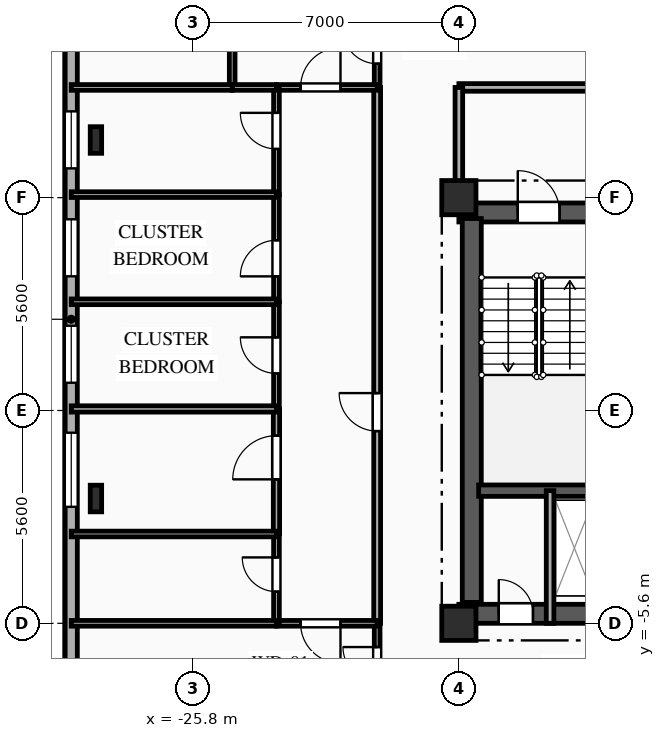
"""IFC4 building model, lengths in metres.
Left out: names, types, materials, properties, quantities, classifications, styles, units other than length and angle.
Written with IfcOpenShell. Run it as: python <this file> out.ifc"""

import sys

from ifc_helpers import new_model, si_unit, direction, frame, frame_2d, origin, origin_2d, place, context, subcontext, project, spatial, rectangle, i_section, extrude, element, fill, save


model = new_model("IFC4")
c1 = context("Model", 3, precision=1e-05, world=origin(), true_north=direction((0.0, 1.0)))
c2 = subcontext(c1, "Body", "Model", "MODEL_VIEW")
j1 = project(units=[si_unit("LENGTHUNIT", "METRE"), si_unit("PLANEANGLEUNIT", "RADIAN")], contexts=[c1])
p1 = place(None, origin())
s1 = spatial("IfcSite", under=j1, at=p1, CompositionType="ELEMENT")
p2 = place(p1, origin())
s2 = spatial("IfcBuilding", under=s1, at=p2, CompositionType="ELEMENT")
p3 = place(p2, frame((0.0, 0.0, 164.5)))
s3 = spatial("IfcBuildingStorey", under=s2, at=p3, CompositionType="ELEMENT", Elevation=164.5)
for number, where, z_axis, x_axis in (
    (1, (-18.8, -5.6, 0.0), (0.0, 0.0, 1.0), (1.0, 0.0, 0.0)),
    (2, (-18.8, 5.6, 0.0), (0.0, 0.0, 1.0), (1.0, 0.0, 0.0)),
):
    element("IfcColumn", number, at=place(p3, frame(where, z_axis=z_axis, x_axis=x_axis)), inside=s3, PredefinedType="COLUMN", context=c2, shape_type="SweptSolid", body=[
        extrude(rectangle(XDim=0.9, YDim=0.9, at=origin_2d()), origin(), (0.0, 0.0, 1.0), 3.35),
    ])
for number, where, z_axis, x_axis in (
    (3, (-28.35, 7.117, 0.0), (0.0, 0.0, 1.0), (1.0, 0.0, 0.0)),
    (4, (-28.35, -2.317, 0.0), (0.0, 0.0, 1.0), (1.0, 0.0, 0.0)),
):
    element("IfcColumn", number, at=place(p3, frame(where, z_axis=z_axis, x_axis=x_axis)), inside=s3, PredefinedType="COLUMN", context=c2, shape_type="SweptSolid", body=[
        extrude(i_section(OverallWidth=0.3, OverallDepth=0.7, WebThickness=0.017, FlangeThickness=0.032, FilletRadius=0.027, at=origin_2d()), origin(), (0.0, 0.0, 1.0), 3.35),
    ])
p4 = place(p3, frame((-29.0, -12.4, 0.0), z_axis=(0.0, 0.0, 1.0), x_axis=(0.0, 1.0, 0.0)))
e5 = element("IfcWall", 5, at=p4, inside=s3, PredefinedType="SOLIDWALL", context=c2, shape_type="SweptSolid", body=[
    extrude(rectangle(XDim=29.6, YDim=0.32, at=frame_2d((14.8, 0.0))), origin(), (0.0, 0.0, 1.0), 3.04),
])
p5 = place(p4, frame((2.855, 0.0, 0.85)))
e6 = element("IfcOpeningElement", 6, at=p5, cuts=e5, PredefinedType="OPENING", context=c2, shape_type="SweptSolid", body=[
    extrude(rectangle(XDim=1.65, YDim=1.85, at=frame_2d((0.825, 0.925))), frame((0.0, 0.17, 0.0), z_axis=(0.0, -1.0, 0.0), x_axis=(1.0, 0.0, 0.0)), (0.0, 0.0, 1.0), 0.34),
])
p6 = place(p4, frame((9.865, 0.0, 0.85)))
e7 = element("IfcOpeningElement", 7, at=p6, cuts=e5, PredefinedType="OPENING", context=c2, shape_type="SweptSolid", body=[
    extrude(rectangle(XDim=1.95, YDim=1.85, at=frame_2d((0.975, 0.925))), frame((0.0, 0.17, 0.0), z_axis=(0.0, -1.0, 0.0), x_axis=(1.0, 0.0, 0.0)), (0.0, 0.0, 1.0), 0.34),
])
p7 = place(p4, frame((13.13, 0.0, 0.85)))
e8 = element("IfcOpeningElement", 8, at=p7, cuts=e5, PredefinedType="OPENING", context=c2, shape_type="SweptSolid", body=[
    extrude(rectangle(XDim=1.5, YDim=1.85, at=frame_2d((0.75, 0.925))), frame((0.0, 0.17, 0.0), z_axis=(0.0, -1.0, 0.0), x_axis=(1.0, 0.0, 0.0)), (0.0, 0.0, 1.0), 0.34),
])
p8 = place(p4, frame((15.93, 0.0, 0.85)))
e9 = element("IfcOpeningElement", 9, at=p8, cuts=e5, PredefinedType="OPENING", context=c2, shape_type="SweptSolid", body=[
    extrude(rectangle(XDim=1.5, YDim=1.85, at=frame_2d((0.75, 0.925))), frame((0.0, 0.17, 0.0), z_axis=(0.0, -1.0, 0.0), x_axis=(1.0, 0.0, 0.0)), (0.0, 0.0, 1.0), 0.34),
])
p9 = place(p4, frame((18.77, 0.0, 0.85)))
e10 = element("IfcOpeningElement", 10, at=p9, cuts=e5, PredefinedType="OPENING", context=c2, shape_type="SweptSolid", body=[
    extrude(rectangle(XDim=1.5, YDim=1.85, at=frame_2d((0.75, 0.925))), frame((0.0, 0.17, 0.0), z_axis=(0.0, -1.0, 0.0), x_axis=(1.0, 0.0, 0.0)), (0.0, 0.0, 1.0), 0.34),
])
p10 = place(p4, frame((24.255, 0.0, 0.85)))
e11 = element("IfcOpeningElement", 11, at=p10, cuts=e5, PredefinedType="OPENING", context=c2, shape_type="SweptSolid", body=[
    extrude(rectangle(XDim=1.65, YDim=1.85, at=frame_2d((0.825, 0.925))), frame((0.0, 0.17, 0.0), z_axis=(0.0, -1.0, 0.0), x_axis=(1.0, 0.0, 0.0)), (0.0, 0.0, 1.0), 0.34),
])
p11 = place(p3, frame((-18.8, 5.21, 0.0), z_axis=(0.0, 0.0, 1.0), x_axis=(1.0, 0.0, 0.0)))
e12 = element("IfcWall", 12, at=p11, inside=s3, PredefinedType="SHEAR", context=c2, shape_type="SweptSolid", body=[
    extrude(rectangle(XDim=9.6, YDim=0.5, at=frame_2d((4.8, 0.0))), origin(), (0.0, 0.0, 1.0), 3.04),
])
p12 = place(p11, frame((1.55, 0.0, 0.0)))
e13 = element("IfcOpeningElement", 13, at=p12, cuts=e12, PredefinedType="OPENING", context=c2, shape_type="SweptSolid", body=[
    extrude(rectangle(XDim=1.1, YDim=2.15, at=frame_2d((0.55, 1.075))), frame((0.0, 0.26, 0.0), z_axis=(0.0, -1.0, 0.0), x_axis=(1.0, 0.0, 0.0)), (0.0, 0.0, 1.0), 0.52),
])
p13 = place(p11, frame((4.775, 0.0, 0.0)))
e14 = element("IfcOpeningElement", 14, at=p13, cuts=e12, PredefinedType="OPENING", context=c2, shape_type="SweptSolid", body=[
    extrude(rectangle(XDim=1.05, YDim=2.1, at=frame_2d((0.525, 1.05))), frame((0.0, 0.26, 0.0), z_axis=(0.0, -1.0, 0.0), x_axis=(1.0, 0.0, 0.0)), (0.0, 0.0, 1.0), 0.52),
])
p14 = place(p3, frame((-18.8, -5.35, 0.0), z_axis=(0.0, 0.0, 1.0), x_axis=(1.0, 0.0, 0.0)))
e15 = element("IfcWall", 15, at=p14, inside=s3, PredefinedType="SHEAR", context=c2, shape_type="SweptSolid", body=[
    extrude(rectangle(XDim=9.6, YDim=0.5, at=frame_2d((4.8, 0.0))), origin(), (0.0, 0.0, 1.0), 3.04),
])
p15 = place(p14, frame((1.05, 0.0, 0.0)))
e16 = element("IfcOpeningElement", 16, at=p15, cuts=e15, PredefinedType="OPENING", context=c2, shape_type="SweptSolid", body=[
    extrude(rectangle(XDim=0.9, YDim=2.1, at=frame_2d((0.45, 1.05))), frame((0.0, 0.26, 0.0), z_axis=(0.0, -1.0, 0.0), x_axis=(1.0, 0.0, 0.0)), (0.0, 0.0, 1.0), 0.52),
])
p16 = place(p3, frame((-18.46, -5.05, 0.0), z_axis=(0.0, 0.0, 1.0), x_axis=(0.0, 1.0, 0.0)))
e17 = element("IfcWall", 17, at=p16, inside=s3, PredefinedType="SHEAR", context=c2, shape_type="SweptSolid", body=[
    extrude(rectangle(XDim=10.1, YDim=0.5, at=frame_2d((5.05, 0.0))), origin(), (0.0, 0.0, 1.0), 3.04),
])
p17 = place(p3, frame((-18.28, -2.11, 0.0), z_axis=(0.0, 0.0, 1.0), x_axis=(1.0, 0.0, 0.0)))
e18 = element("IfcWall", 18, at=p17, inside=s3, PredefinedType="SHEAR", context=c2, shape_type="SweptSolid", body=[
    extrude(rectangle(XDim=3.18, YDim=0.3, at=frame_2d((1.59, 0.0))), origin(), (0.0, 0.0, 1.0), 3.04),
])
p18 = place(p3, frame((-16.4, -5.6, 0.0), z_axis=(0.0, 0.0, 1.0), x_axis=(0.0, 1.0, 0.0)))
e19 = element("IfcWall", 19, at=p18, inside=s3, PredefinedType="PARTITIONING", context=c2, shape_type="SweptSolid", body=[
    extrude(rectangle(XDim=3.49, YDim=0.2, at=frame_2d((1.745, 0.0))), origin(), (0.0, 0.0, 1.0), 3.04),
])
p19 = place(p3, frame((-12.0, 8.5, 0.0), z_axis=(0.0, 0.0, 1.0), x_axis=(-1.0, 0.0, 0.0)))
e20 = element("IfcWall", 20, at=p19, inside=s3, PredefinedType="PARTITIONING", context=c2, shape_type="SweptSolid", body=[
    extrude(rectangle(XDim=6.8, YDim=0.2, at=frame_2d((3.4, 0.0))), origin(), (0.0, 0.0, 1.0), 3.04),
])
p20 = place(p19, frame((1.715, 0.0, 0.0)))
e21 = element("IfcOpeningElement", 21, at=p20, cuts=e20, PredefinedType="OPENING", context=c2, shape_type="SweptSolid", body=[
    extrude(rectangle(XDim=1.1, YDim=2.15, at=frame_2d((0.55, 1.075))), frame((0.0, 0.11, 0.0), z_axis=(0.0, -1.0, 0.0), x_axis=(1.0, 0.0, 0.0)), (0.0, 0.0, 1.0), 0.22),
])
p21 = place(p3, frame((-18.8, 8.5, 0.0), z_axis=(0.0, 0.0, 1.0), x_axis=(0.0, -1.0, 0.0)))
e22 = element("IfcWall", 22, at=p21, inside=s3, PredefinedType="PARTITIONING", context=c2, shape_type="SweptSolid", body=[
    extrude(rectangle(XDim=2.9, YDim=0.2, at=frame_2d((1.45, 0.0))), origin(), (0.0, 0.0, 1.0), 2.525),
])
p22 = place(p3, frame((-20.95, 8.5, 0.0), z_axis=(0.0, 0.0, 1.0), x_axis=(0.0, 1.0, 0.0)))
e23 = element("IfcWall", 23, at=p22, inside=s3, PredefinedType="PARTITIONING", context=c2, shape_type="SweptSolid", body=[
    extrude(rectangle(XDim=2.15, YDim=0.15, at=frame_2d((1.075, 0.0))), origin(), (0.0, 0.0, 1.0), 3.04),
])
p23 = place(p22, frame((0.625, 0.0, 0.0)))
e24 = element("IfcOpeningElement", 24, at=p23, cuts=e23, PredefinedType="OPENING", context=c2, shape_type="SweptSolid", body=[
    extrude(rectangle(XDim=0.9, YDim=2.1, at=frame_2d((0.45, 1.05))), frame((0.0, 0.085, 0.0), z_axis=(0.0, -1.0, 0.0), x_axis=(1.0, 0.0, 0.0)), (0.0, 0.0, 1.0), 0.17),
])
p24 = place(p3, frame((-20.95, -7.75, 0.0), z_axis=(0.0, 0.0, 1.0), x_axis=(0.0, 1.0, 0.0)))
e25 = element("IfcWall", 25, at=p24, inside=s3, PredefinedType="PARTITIONING", context=c2, shape_type="SweptSolid", body=[
    extrude(rectangle(XDim=2.15, YDim=0.15, at=frame_2d((1.075, 0.0))), origin(), (0.0, 0.0, 1.0), 3.04),
])
p25 = place(p24, frame((0.625, 0.0, 0.0)))
e26 = element("IfcOpeningElement", 26, at=p25, cuts=e25, PredefinedType="OPENING", context=c2, shape_type="SweptSolid", body=[
    extrude(rectangle(XDim=0.9, YDim=2.1, at=frame_2d((0.45, 1.05))), frame((0.0, 0.085, 0.0), z_axis=(0.0, -1.0, 0.0), x_axis=(1.0, 0.0, 0.0)), (0.0, 0.0, 1.0), 0.17),
])
p26 = place(p3, frame((-20.95, -5.6, 0.0), z_axis=(0.0, 0.0, 1.0), x_axis=(0.0, 1.0, 0.0)))
e27 = element("IfcWall", 27, at=p26, inside=s3, PredefinedType="PARTITIONING", context=c2, shape_type="SweptSolid", body=[
    extrude(rectangle(XDim=14.1, YDim=0.18, at=frame_2d((7.05, 0.0))), origin(), (0.0, 0.0, 1.0), 3.04),
])
p27 = place(p26, frame((5.058, 0.0, 0.0)))
e28 = element("IfcOpeningElement", 28, at=p27, cuts=e27, PredefinedType="OPENING", context=c2, shape_type="SweptSolid", body=[
    extrude(rectangle(XDim=1.0, YDim=2.15, at=frame_2d((0.5, 1.075))), frame((0.0, 0.1, 0.0), z_axis=(0.0, -1.0, 0.0), x_axis=(1.0, 0.0, 0.0)), (0.0, 0.0, 1.0), 0.2),
])
p28 = place(p3, frame((-23.6, 8.5, 0.0), z_axis=(0.0, 0.0, 1.0), x_axis=(1.0, 0.0, 0.0)))
e29 = element("IfcWall", 29, at=p28, inside=s3, PredefinedType="PARTITIONING", context=c2, shape_type="SweptSolid", body=[
    extrude(rectangle(XDim=2.65, YDim=0.15, at=frame_2d((1.325, 0.0))), origin(), (0.0, 0.0, 1.0), 3.04),
])
p29 = place(p28, frame((0.635, 0.0, 0.0)))
e30 = element("IfcOpeningElement", 30, at=p29, cuts=e29, PredefinedType="OPENING", context=c2, shape_type="SweptSolid", body=[
    extrude(rectangle(XDim=1.05, YDim=2.15, at=frame_2d((0.525, 1.075))), frame((0.0, 0.085, 0.0), z_axis=(0.0, -1.0, 0.0), x_axis=(1.0, 0.0, 0.0)), (0.0, 0.0, 1.0), 0.17),
])
p30 = place(p3, frame((-20.95, -5.6, 0.0), z_axis=(0.0, 0.0, 1.0), x_axis=(-1.0, 0.0, 0.0)))
e31 = element("IfcWall", 31, at=p30, inside=s3, PredefinedType="PARTITIONING", context=c2, shape_type="SweptSolid", body=[
    extrude(rectangle(XDim=2.65, YDim=0.15, at=frame_2d((1.325, 0.0))), origin(), (0.0, 0.0, 1.0), 3.04),
])
p31 = place(p30, frame((0.965, 0.0, 0.0)))
e32 = element("IfcOpeningElement", 32, at=p31, cuts=e31, PredefinedType="OPENING", context=c2, shape_type="SweptSolid", body=[
    extrude(rectangle(XDim=1.05, YDim=2.15, at=frame_2d((0.525, 1.075))), frame((0.0, 0.085, 0.0), z_axis=(0.0, -1.0, 0.0), x_axis=(1.0, 0.0, 0.0)), (0.0, 0.0, 1.0), 0.17),
])
p32 = place(p3, frame((-23.6, -5.6, 0.0), z_axis=(0.0, 0.0, 1.0), x_axis=(0.0, 1.0, 0.0)))
e33 = element("IfcWall", 33, at=p32, inside=s3, PredefinedType="PLUMBINGWALL", context=c2, shape_type="SweptSolid", body=[
    extrude(rectangle(XDim=2.35, YDim=0.15, at=frame_2d((1.175, 0.0))), origin(), (0.0, 0.0, 1.0), 2.695),
])
p33 = place(p32, frame((0.834, 0.0, 0.0)))
e34 = element("IfcOpeningElement", 34, at=p33, cuts=e33, PredefinedType="OPENING", context=c2, shape_type="SweptSolid", body=[
    extrude(rectangle(XDim=0.9, YDim=2.1, at=frame_2d((0.45, 1.05))), frame((0.0, 0.085, 0.0), z_axis=(0.0, -1.0, 0.0), x_axis=(1.0, 0.0, 0.0)), (0.0, 0.0, 1.0), 0.17),
])
p34 = place(p3, frame((-23.6, -3.25, 0.0), z_axis=(0.0, 0.0, 1.0), x_axis=(0.0, 1.0, 0.0)))
e35 = element("IfcWall", 35, at=p34, inside=s3, PredefinedType="PARTITIONING", context=c2, shape_type="SweptSolid", body=[
    extrude(rectangle(XDim=3.29, YDim=0.165, at=frame_2d((1.645, 0.0))), origin(), (0.0, 0.0, 1.0), 2.695),
])
p35 = place(p34, frame((1.438, 0.0, 0.0)))
e36 = element("IfcOpeningElement", 36, at=p35, cuts=e35, PredefinedType="OPENING", context=c2, shape_type="SweptSolid", body=[
    extrude(rectangle(XDim=1.15, YDim=2.15, at=frame_2d((0.575, 1.075))), frame((0.0, 0.093, 0.0), z_axis=(0.0, -1.0, 0.0), x_axis=(1.0, 0.0, 0.0)), (0.0, 0.0, 1.0), 0.185),
])
p36 = place(p3, frame((-23.6, 0.04, 0.0), z_axis=(0.0, 0.0, 1.0), x_axis=(0.0, 1.0, 0.0)))
e37 = element("IfcWall", 37, at=p36, inside=s3, PredefinedType="PARTITIONING", context=c2, shape_type="SweptSolid", body=[
    extrude(rectangle(XDim=2.82, YDim=0.15, at=frame_2d((1.41, 0.0))), origin(), (0.0, 0.0, 1.0), 2.695),
])
p37 = place(p36, frame((0.935, 0.0, 0.0)))
e38 = element("IfcOpeningElement", 38, at=p37, cuts=e37, PredefinedType="OPENING", context=c2, shape_type="SweptSolid", body=[
    extrude(rectangle(XDim=0.95, YDim=2.1, at=frame_2d((0.475, 1.05))), frame((0.0, 0.085, 0.0), z_axis=(0.0, -1.0, 0.0), x_axis=(1.0, 0.0, 0.0)), (0.0, 0.0, 1.0), 0.17),
])
p38 = place(p3, frame((-23.6, 2.86, 0.0), z_axis=(0.0, 0.0, 1.0), x_axis=(0.0, 1.0, 0.0)))
e39 = element("IfcWall", 39, at=p38, inside=s3, PredefinedType="PARTITIONING", context=c2, shape_type="SweptSolid", body=[
    extrude(rectangle(XDim=2.82, YDim=0.15, at=frame_2d((1.41, 0.0))), origin(), (0.0, 0.0, 1.0), 2.695),
])
p39 = place(p38, frame((0.669, 0.0, 0.0)))
e40 = element("IfcOpeningElement", 40, at=p39, cuts=e39, PredefinedType="OPENING", context=c2, shape_type="SweptSolid", body=[
    extrude(rectangle(XDim=0.95, YDim=2.1, at=frame_2d((0.475, 1.05))), frame((0.0, 0.085, 0.0), z_axis=(0.0, -1.0, 0.0), x_axis=(1.0, 0.0, 0.0)), (0.0, 0.0, 1.0), 0.17),
])
p40 = place(p3, frame((-23.6, 5.68, 0.0), z_axis=(0.0, 0.0, 1.0), x_axis=(0.0, 1.0, 0.0)))
e41 = element("IfcWall", 41, at=p40, inside=s3, PredefinedType="PARTITIONING", context=c2, shape_type="SweptSolid", body=[
    extrude(rectangle(XDim=2.82, YDim=0.15, at=frame_2d((1.41, 0.0))), origin(), (0.0, 0.0, 1.0), 2.695),
])
p41 = place(p40, frame((1.201, 0.0, 0.0)))
e42 = element("IfcOpeningElement", 42, at=p41, cuts=e41, PredefinedType="OPENING", context=c2, shape_type="SweptSolid", body=[
    extrude(rectangle(XDim=0.95, YDim=2.1, at=frame_2d((0.475, 1.05))), frame((0.0, 0.085, 0.0), z_axis=(0.0, -1.0, 0.0), x_axis=(1.0, 0.0, 0.0)), (0.0, 0.0, 1.0), 0.17),
])
p42 = place(p3, frame((-24.765, 8.5, 0.0), z_axis=(0.0, 0.0, 1.0), x_axis=(0.0, 1.0, 0.0)))
e43 = element("IfcWall", 43, at=p42, inside=s3, PredefinedType="PARTITIONING", context=c2, shape_type="SweptSolid", body=[
    extrude(rectangle(XDim=11.9, YDim=0.15, at=frame_2d((5.95, 0.0))), origin(), (0.0, 0.0, 1.0), 3.04),
])
p43 = place(p42, frame((3.002, 0.0, 0.0)))
e44 = element("IfcOpeningElement", 44, at=p43, cuts=e43, PredefinedType="OPENING", context=c2, shape_type="SweptSolid", body=[
    extrude(rectangle(XDim=1.05, YDim=2.15, at=frame_2d((0.525, 1.075))), frame((0.0, 0.085, 0.0), z_axis=(0.0, -1.0, 0.0), x_axis=(1.0, 0.0, 0.0)), (0.0, 0.0, 1.0), 0.17),
])
p44 = place(p3, frame((-23.6, 8.5, 0.0), z_axis=(0.0, 0.0, 1.0), x_axis=(-1.0, 0.0, 0.0)))
e45 = element("IfcWall", 45, at=p44, inside=s3, PredefinedType="PARTITIONING", context=c2, shape_type="SweptSolid", body=[
    extrude(rectangle(XDim=1.165, YDim=0.15, at=frame_2d((0.583, 0.0))), origin(), (0.0, 0.0, 1.0), 3.04),
])
p45 = place(p3, frame((-24.765, 8.5, 0.0), z_axis=(0.0, 0.0, 1.0), x_axis=(-1.0, 0.0, 0.0)))
e46 = element("IfcWall", 46, at=p45, inside=s3, PredefinedType="PARTITIONING", context=c2, shape_type="SweptSolid", body=[
    extrude(rectangle(XDim=4.235, YDim=0.15, at=frame_2d((2.118, 0.0))), origin(), (0.0, 0.0, 1.0), 3.04),
])
for number, where, z_axis, x_axis in (
    (47, (-29.0, -5.6, 0.0), (0.0, 0.0, 1.0), (1.0, 0.0, 0.0)),
    (48, (-29.0, -3.25, 0.0), (0.0, 0.0, 1.0), (1.0, 0.0, 0.0)),
):
    element("IfcWall", number, at=place(p3, frame(where, z_axis=z_axis, x_axis=x_axis)), inside=s3, PredefinedType="PLUMBINGWALL", context=c2, shape_type="SweptSolid", body=[
        extrude(rectangle(XDim=5.4, YDim=0.15, at=frame_2d((2.7, 0.0))), origin(), (0.0, 0.0, 1.0), 3.04),
    ])
p46 = place(p3, frame((-29.0, 0.04, 0.0), z_axis=(0.0, 0.0, 1.0), x_axis=(1.0, 0.0, 0.0)))
e49 = element("IfcWall", 49, at=p46, inside=s3, PredefinedType="PARTITIONING", context=c2, shape_type="SweptSolid", body=[
    extrude(rectangle(XDim=5.4, YDim=0.165, at=frame_2d((2.7, 0.0))), origin(), (0.0, 0.0, 1.0), 3.04),
])
for number, where, z_axis, x_axis in (
    (50, (-29.0, 2.86, 0.0), (0.0, 0.0, 1.0), (1.0, 0.0, 0.0)),
    (51, (-29.0, 5.68, 0.0), (0.0, 0.0, 1.0), (1.0, 0.0, 0.0)),
):
    element("IfcWall", number, at=place(p3, frame(where, z_axis=z_axis, x_axis=x_axis)), inside=s3, PredefinedType="PARTITIONING", context=c2, shape_type="SweptSolid", body=[
        extrude(rectangle(XDim=5.4, YDim=0.15, at=frame_2d((2.7, 0.0))), origin(), (0.0, 0.0, 1.0), 3.04),
    ])
p47 = place(p6, origin())
e52 = element("IfcWindow", 52, at=p47, inside=s3, PartitioningType="SINGLE_PANEL", PredefinedType="WINDOW", context=c2, shape_type="SweptSolid", body=[
    extrude(rectangle(XDim=1.95, YDim=1.85, at=frame_2d((0.975, 0.925))), frame((0.0, 0.03, 0.0), z_axis=(0.0, -1.0, 0.0), x_axis=(1.0, 0.0, 0.0)), (0.0, 0.0, 1.0), 0.06),
])
fill(e7, e52)
p48 = place(p7, origin())
e53 = element("IfcWindow", 53, at=p48, inside=s3, PartitioningType="SINGLE_PANEL", PredefinedType="WINDOW", context=c2, shape_type="SweptSolid", body=[
    extrude(rectangle(XDim=1.5, YDim=1.85, at=frame_2d((0.75, 0.925))), frame((0.0, 0.03, 0.0), z_axis=(0.0, -1.0, 0.0), x_axis=(1.0, 0.0, 0.0)), (0.0, 0.0, 1.0), 0.06),
])
fill(e8, e53)
p49 = place(p8, origin())
e54 = element("IfcWindow", 54, at=p49, inside=s3, PartitioningType="SINGLE_PANEL", PredefinedType="WINDOW", context=c2, shape_type="SweptSolid", body=[
    extrude(rectangle(XDim=1.5, YDim=1.85, at=frame_2d((0.75, 0.925))), frame((0.0, 0.03, 0.0), z_axis=(0.0, -1.0, 0.0), x_axis=(1.0, 0.0, 0.0)), (0.0, 0.0, 1.0), 0.06),
])
fill(e9, e54)
p50 = place(p9, origin())
e55 = element("IfcWindow", 55, at=p50, inside=s3, PartitioningType="SINGLE_PANEL", PredefinedType="WINDOW", context=c2, shape_type="SweptSolid", body=[
    extrude(rectangle(XDim=1.5, YDim=1.85, at=frame_2d((0.75, 0.925))), frame((0.0, 0.03, 0.0), z_axis=(0.0, -1.0, 0.0), x_axis=(1.0, 0.0, 0.0)), (0.0, 0.0, 1.0), 0.06),
])
fill(e10, e55)
p51 = place(p12, origin())
e56 = element("IfcDoor", 56, at=p51, inside=s3, OperationType="SINGLE_SWING_LEFT", PredefinedType="DOOR", context=c2, shape_type="SweptSolid", body=[
    extrude(rectangle(XDim=1.1, YDim=2.15, at=frame_2d((0.55, 1.075))), frame((0.0, 0.025, 0.0), z_axis=(0.0, -1.0, 0.0), x_axis=(1.0, 0.0, 0.0)), (0.0, 0.0, 1.0), 0.05),
])
fill(e13, e56)
p52 = place(p15, origin())
e57 = element("IfcDoor", 57, at=p52, inside=s3, OperationType="SINGLE_SWING_LEFT", PredefinedType="DOOR", context=c2, shape_type="SweptSolid", body=[
    extrude(rectangle(XDim=0.9, YDim=2.1, at=frame_2d((0.45, 1.05))), frame((0.0, 0.025, 0.0), z_axis=(0.0, -1.0, 0.0), x_axis=(1.0, 0.0, 0.0)), (0.0, 0.0, 1.0), 0.05),
])
fill(e16, e57)
p53 = place(p23, origin())
e58 = element("IfcDoor", 58, at=p53, inside=s3, OperationType="SINGLE_SWING_RIGHT", PredefinedType="DOOR", context=c2, shape_type="SweptSolid", body=[
    extrude(rectangle(XDim=0.9, YDim=2.1, at=frame_2d((0.45, 1.05))), frame((0.0, 0.025, 0.0), z_axis=(0.0, -1.0, 0.0), x_axis=(1.0, 0.0, 0.0)), (0.0, 0.0, 1.0), 0.05),
])
fill(e24, e58)
p54 = place(p25, origin())
e59 = element("IfcDoor", 59, at=p54, inside=s3, OperationType="SINGLE_SWING_RIGHT", PredefinedType="DOOR", context=c2, shape_type="SweptSolid", body=[
    extrude(rectangle(XDim=0.9, YDim=2.1, at=frame_2d((0.45, 1.05))), frame((0.0, 0.025, 0.0), z_axis=(0.0, -1.0, 0.0), x_axis=(1.0, 0.0, 0.0)), (0.0, 0.0, 1.0), 0.05),
])
fill(e26, e59)
p55 = place(p27, origin())
e60 = element("IfcDoor", 60, at=p55, inside=s3, OperationType="SINGLE_SWING_RIGHT", PredefinedType="DOOR", context=c2, shape_type="SweptSolid", body=[
    extrude(rectangle(XDim=1.0, YDim=2.15, at=frame_2d((0.5, 1.075))), frame((0.0, 0.025, 0.0), z_axis=(0.0, -1.0, 0.0), x_axis=(1.0, 0.0, 0.0)), (0.0, 0.0, 1.0), 0.05),
])
fill(e28, e60)
p56 = place(p29, origin())
e61 = element("IfcDoor", 61, at=p56, inside=s3, OperationType="SINGLE_SWING_RIGHT", PredefinedType="DOOR", context=c2, shape_type="SweptSolid", body=[
    extrude(rectangle(XDim=1.05, YDim=2.15, at=frame_2d((0.525, 1.075))), frame((0.0, 0.025, 0.0), z_axis=(0.0, -1.0, 0.0), x_axis=(1.0, 0.0, 0.0)), (0.0, 0.0, 1.0), 0.05),
])
fill(e30, e61)
p57 = place(p31, origin())
e62 = element("IfcDoor", 62, at=p57, inside=s3, OperationType="SINGLE_SWING_LEFT", PredefinedType="DOOR", context=c2, shape_type="SweptSolid", body=[
    extrude(rectangle(XDim=1.05, YDim=2.15, at=frame_2d((0.525, 1.075))), frame((0.0, 0.025, 0.0), z_axis=(0.0, -1.0, 0.0), x_axis=(1.0, 0.0, 0.0)), (0.0, 0.0, 1.0), 0.05),
])
fill(e32, e62)
p58 = place(p33, origin())
e63 = element("IfcDoor", 63, at=p58, inside=s3, OperationType="SINGLE_SWING_RIGHT", PredefinedType="DOOR", context=c2, shape_type="SweptSolid", body=[
    extrude(rectangle(XDim=0.9, YDim=2.1, at=frame_2d((0.45, 1.05))), frame((0.0, 0.025, 0.0), z_axis=(0.0, -1.0, 0.0), x_axis=(1.0, 0.0, 0.0)), (0.0, 0.0, 1.0), 0.05),
])
fill(e34, e63)
p59 = place(p35, origin())
e64 = element("IfcDoor", 64, at=p59, inside=s3, OperationType="SINGLE_SWING_LEFT", PredefinedType="DOOR", context=c2, shape_type="SweptSolid", body=[
    extrude(rectangle(XDim=1.15, YDim=2.15, at=frame_2d((0.575, 1.075))), frame((0.0, 0.025, 0.0), z_axis=(0.0, -1.0, 0.0), x_axis=(1.0, 0.0, 0.0)), (0.0, 0.0, 1.0), 0.05),
])
fill(e36, e64)
p60 = place(p37, origin())
e65 = element("IfcDoor", 65, at=p60, inside=s3, OperationType="SINGLE_SWING_RIGHT", PredefinedType="DOOR", context=c2, shape_type="SweptSolid", body=[
    extrude(rectangle(XDim=0.95, YDim=2.1, at=frame_2d((0.475, 1.05))), frame((0.0, 0.025, 0.0), z_axis=(0.0, -1.0, 0.0), x_axis=(1.0, 0.0, 0.0)), (0.0, 0.0, 1.0), 0.05),
])
fill(e38, e65)
p61 = place(p39, origin())
e66 = element("IfcDoor", 66, at=p61, inside=s3, OperationType="SINGLE_SWING_LEFT", PredefinedType="DOOR", context=c2, shape_type="SweptSolid", body=[
    extrude(rectangle(XDim=0.95, YDim=2.1, at=frame_2d((0.475, 1.05))), frame((0.0, 0.025, 0.0), z_axis=(0.0, -1.0, 0.0), x_axis=(1.0, 0.0, 0.0)), (0.0, 0.0, 1.0), 0.05),
])
fill(e40, e66)
p62 = place(p41, origin())
e67 = element("IfcDoor", 67, at=p62, inside=s3, OperationType="SINGLE_SWING_RIGHT", PredefinedType="DOOR", context=c2, shape_type="SweptSolid", body=[
    extrude(rectangle(XDim=0.95, YDim=2.1, at=frame_2d((0.475, 1.05))), frame((0.0, 0.025, 0.0), z_axis=(0.0, -1.0, 0.0), x_axis=(1.0, 0.0, 0.0)), (0.0, 0.0, 1.0), 0.05),
])
fill(e42, e67)
save(model, sys.argv[1])
